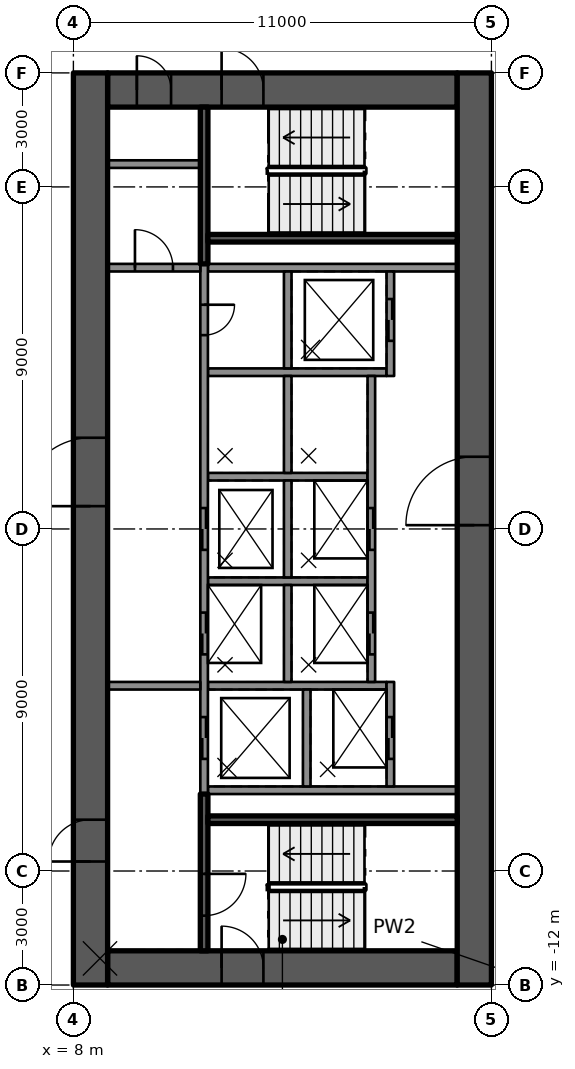
"""IFC4 building model, lengths in metres.
Left out: names, types, materials, properties, quantities, classifications, styles, units other than length and angle.
Written with IfcOpenShell. Run it as: python <this file> out.ifc"""

import sys

from ifc_helpers import new_model, si_unit, direction, frame, frame_2d, origin, place, context, subcontext, project, spatial, rectangle, extrude, element, fill, save


model = new_model("IFC4")
c1 = context("Model", 3, precision=1e-05, world=origin(), true_north=direction((0.0, 1.0)))
c2 = subcontext(c1, "Body", "Model", "MODEL_VIEW")
j1 = project(units=[si_unit("LENGTHUNIT", "METRE"), si_unit("PLANEANGLEUNIT", "RADIAN")], contexts=[c1])
p1 = place(None, origin())
s1 = spatial("IfcSite", under=j1, at=p1, CompositionType="ELEMENT")
p2 = place(p1, origin())
s2 = spatial("IfcBuilding", under=s1, at=p2, CompositionType="ELEMENT")
p3 = place(p2, frame((0.0, 0.0, 69.3)))
s3 = spatial("IfcBuildingStorey", under=s2, at=p3, CompositionType="ELEMENT", Elevation=69.3)
p4 = place(p3, frame((8.9, 11.55, 0.0), z_axis=(0.0, 0.0, 1.0), x_axis=(1.0, 0.0, 0.0)))
e1 = element("IfcWall", 1, at=p4, inside=s3, PredefinedType="SHEAR", context=c2, shape_type="SweptSolid", body=[
    extrude(rectangle(XDim=9.2, YDim=0.9, at=frame_2d((4.6, 0.0))), origin(), (0.0, 0.0, 1.0), 3.5),
])
p5 = place(p4, frame((3.0, 0.0, 0.0)))
e2 = element("IfcOpeningElement", 2, at=p5, cuts=e1, PredefinedType="OPENING", context=c2, shape_type="SweptSolid", body=[
    extrude(rectangle(XDim=1.1, YDim=2.1, at=frame_2d((0.55, 1.05))), frame((0.0, 0.46, 0.0), z_axis=(0.0, -1.0, 0.0), x_axis=(1.0, 0.0, 0.0)), (0.0, 0.0, 1.0), 0.92),
])
p6 = place(p4, frame((0.77, 0.0, 0.0)))
e3 = element("IfcOpeningElement", 3, at=p6, cuts=e1, PredefinedType="OPENING", context=c2, shape_type="SweptSolid", body=[
    extrude(rectangle(XDim=0.9, YDim=2.1, at=frame_2d((0.45, 1.05))), frame((0.0, 0.46, 0.0), z_axis=(0.0, -1.0, 0.0), x_axis=(1.0, 0.0, 0.0)), (0.0, 0.0, 1.0), 0.92),
])
p7 = place(p3, frame((8.9, -11.55, 0.0), z_axis=(0.0, 0.0, 1.0), x_axis=(1.0, 0.0, 0.0)))
e4 = element("IfcWall", 4, at=p7, inside=s3, PredefinedType="SHEAR", context=c2, shape_type="SweptSolid", body=[
    extrude(rectangle(XDim=9.2, YDim=0.9, at=frame_2d((4.6, 0.0))), origin(), (0.0, 0.0, 1.0), 3.5),
])
p8 = place(p7, frame((3.0, 0.0, 0.0)))
e5 = element("IfcOpeningElement", 5, at=p8, cuts=e4, PredefinedType="OPENING", context=c2, shape_type="SweptSolid", body=[
    extrude(rectangle(XDim=1.1, YDim=2.1, at=frame_2d((0.55, 1.05))), frame((0.0, 0.46, 0.0), z_axis=(0.0, -1.0, 0.0), x_axis=(1.0, 0.0, 0.0)), (0.0, 0.0, 1.0), 0.92),
])
p9 = place(p3, frame((8.45, -12.0, 0.0), z_axis=(0.0, 0.0, 1.0), x_axis=(0.0, 1.0, 0.0)))
e6 = element("IfcWall", 6, at=p9, inside=s3, PredefinedType="SHEAR", context=c2, shape_type="SweptSolid", body=[
    extrude(rectangle(XDim=24.0, YDim=0.9, at=frame_2d((12.0, 0.0))), origin(), (0.0, 0.0, 1.0), 3.5),
])
p10 = place(p9, frame((12.6, 0.0, 0.0)))
e7 = element("IfcOpeningElement", 7, at=p10, cuts=e6, PredefinedType="OPENING", context=c2, shape_type="SweptSolid", body=[
    extrude(rectangle(XDim=1.8, YDim=2.1, at=frame_2d((0.9, 1.05))), frame((0.0, 0.46, 0.0), z_axis=(0.0, -1.0, 0.0), x_axis=(1.0, 0.0, 0.0)), (0.0, 0.0, 1.0), 0.92),
])
p11 = place(p9, frame((3.25, 0.0, 0.0)))
e8 = element("IfcOpeningElement", 8, at=p11, cuts=e6, PredefinedType="OPENING", context=c2, shape_type="SweptSolid", body=[
    extrude(rectangle(XDim=1.1, YDim=2.1, at=frame_2d((0.55, 1.05))), frame((0.0, 0.46, 0.0), z_axis=(0.0, -1.0, 0.0), x_axis=(1.0, 0.0, 0.0)), (0.0, 0.0, 1.0), 0.92),
])
p12 = place(p3, frame((18.55, -12.0, 0.0), z_axis=(0.0, 0.0, 1.0), x_axis=(0.0, 1.0, 0.0)))
e9 = element("IfcWall", 9, at=p12, inside=s3, PredefinedType="SHEAR", context=c2, shape_type="SweptSolid", body=[
    extrude(rectangle(XDim=24.0, YDim=0.9, at=frame_2d((12.0, 0.0))), origin(), (0.0, 0.0, 1.0), 3.5),
])
p13 = place(p12, frame((12.1, 0.0, 0.0)))
e10 = element("IfcOpeningElement", 10, at=p13, cuts=e9, PredefinedType="OPENING", context=c2, shape_type="SweptSolid", body=[
    extrude(rectangle(XDim=1.8, YDim=2.1, at=frame_2d((0.9, 1.05))), frame((0.0, 0.46, 0.0), z_axis=(0.0, -1.0, 0.0), x_axis=(1.0, 0.0, 0.0)), (0.0, 0.0, 1.0), 0.92),
])
for number, where, z_axis, x_axis in (
    (11, (11.54, -6.875, 0.0), (0.0, 0.0, 1.0), (1.0, 0.0, 0.0)),
    (12, (11.54, 6.875, 0.0), (0.0, 0.0, 1.0), (1.0, 0.0, 0.0)),
):
    element("IfcWall", number, at=place(p3, frame(where, z_axis=z_axis, x_axis=x_axis)), inside=s3, PredefinedType="SOLIDWALL", context=c2, shape_type="SweptSolid", body=[
        extrude(rectangle(XDim=6.56, YDim=0.2, at=frame_2d((3.28, 0.0))), origin(), (0.0, 0.0, 1.0), 3.09),
    ])
p14 = place(p3, frame((11.54, 4.125, 0.0), z_axis=(0.0, 0.0, 1.0), x_axis=(1.0, 0.0, 0.0)))
e13 = element("IfcWall", 13, at=p14, inside=s3, PredefinedType="SOLIDWALL", context=c2, shape_type="SweptSolid", body=[
    extrude(rectangle(XDim=4.7, YDim=0.2, at=frame_2d((2.35, 0.0))), origin(), (0.0, 0.0, 1.0), 3.09),
])
for number, where, z_axis, x_axis in (
    (14, (11.54, 1.375, 0.0), (0.0, 0.0, 1.0), (1.0, 0.0, 0.0)),
    (15, (11.54, -1.375, 0.0), (0.0, 0.0, 1.0), (1.0, 0.0, 0.0)),
):
    element("IfcWall", number, at=place(p3, frame(where, z_axis=z_axis, x_axis=x_axis)), inside=s3, PredefinedType="SOLIDWALL", context=c2, shape_type="SweptSolid", body=[
        extrude(rectangle(XDim=4.2, YDim=0.2, at=frame_2d((2.1, 0.0))), origin(), (0.0, 0.0, 1.0), 3.09),
    ])
p15 = place(p3, frame((11.54, -4.125, 0.0), z_axis=(0.0, 0.0, 1.0), x_axis=(1.0, 0.0, 0.0)))
e16 = element("IfcWall", 16, at=p15, inside=s3, PredefinedType="SOLIDWALL", context=c2, shape_type="SweptSolid", body=[
    extrude(rectangle(XDim=4.7, YDim=0.2, at=frame_2d((2.35, 0.0))), origin(), (0.0, 0.0, 1.0), 3.09),
])
p16 = place(p3, frame((11.44, 6.975, 0.0), z_axis=(0.0, 0.0, 1.0), x_axis=(0.0, -1.0, 0.0)))
e17 = element("IfcWall", 17, at=p16, inside=s3, PredefinedType="SOLIDWALL", context=c2, shape_type="SweptSolid", body=[
    extrude(rectangle(XDim=13.95, YDim=0.2, at=frame_2d((6.975, 0.0))), origin(), (0.0, 0.0, 1.0), 3.09),
])
p17 = place(p16, frame((6.425, 0.0, 0.0)))
e18 = element("IfcOpeningElement", 18, at=p17, cuts=e17, PredefinedType="OPENING", context=c2, shape_type="SweptSolid", body=[
    extrude(rectangle(XDim=1.1, YDim=2.1, at=frame_2d((0.55, 1.05))), frame((0.0, 0.11, 0.0), z_axis=(0.0, -1.0, 0.0), x_axis=(1.0, 0.0, 0.0)), (0.0, 0.0, 1.0), 0.22),
])
p18 = place(p16, frame((9.175, 0.0, 0.0)))
e19 = element("IfcOpeningElement", 19, at=p18, cuts=e17, PredefinedType="OPENING", context=c2, shape_type="SweptSolid", body=[
    extrude(rectangle(XDim=1.1, YDim=2.1, at=frame_2d((0.55, 1.05))), frame((0.0, 0.11, 0.0), z_axis=(0.0, -1.0, 0.0), x_axis=(1.0, 0.0, 0.0)), (0.0, 0.0, 1.0), 0.22),
])
p19 = place(p16, frame((11.925, 0.0, 0.0)))
e20 = element("IfcOpeningElement", 20, at=p19, cuts=e17, PredefinedType="OPENING", context=c2, shape_type="SweptSolid", body=[
    extrude(rectangle(XDim=1.1, YDim=2.1, at=frame_2d((0.55, 1.05))), frame((0.0, 0.11, 0.0), z_axis=(0.0, -1.0, 0.0), x_axis=(1.0, 0.0, 0.0)), (0.0, 0.0, 1.0), 0.22),
])
p20 = place(p16, frame((1.075, 0.0, 0.0)))
e21 = element("IfcOpeningElement", 21, at=p20, cuts=e17, PredefinedType="OPENING", context=c2, shape_type="SweptSolid", body=[
    extrude(rectangle(XDim=0.8, YDim=2.1, at=frame_2d((0.4, 1.05))), frame((0.0, 0.11, 0.0), z_axis=(0.0, -1.0, 0.0), x_axis=(1.0, 0.0, 0.0)), (0.0, 0.0, 1.0), 0.22),
])
for number, where, z_axis, x_axis in (
    (22, (13.64, 6.775, 0.0), (0.0, 0.0, 1.0), (0.0, -1.0, 0.0)),
    (23, (13.64, 4.025, 0.0), (0.0, 0.0, 1.0), (0.0, -1.0, 0.0)),
    (24, (13.64, 1.275, 0.0), (0.0, 0.0, 1.0), (0.0, -1.0, 0.0)),
    (25, (13.64, -1.475, 0.0), (0.0, 0.0, 1.0), (0.0, -1.0, 0.0)),
    (26, (14.14, -4.225, 0.0), (0.0, 0.0, 1.0), (0.0, -1.0, 0.0)),
):
    element("IfcWall", number, at=place(p3, frame(where, z_axis=z_axis, x_axis=x_axis)), inside=s3, PredefinedType="SOLIDWALL", context=c2, shape_type="SweptSolid", body=[
        extrude(rectangle(XDim=2.55, YDim=0.2, at=frame_2d((1.275, 0.0))), origin(), (0.0, 0.0, 1.0), 3.09),
    ])
p21 = place(p3, frame((16.34, 6.775, 0.0), z_axis=(0.0, 0.0, 1.0), x_axis=(0.0, -1.0, 0.0)))
e27 = element("IfcWall", 27, at=p21, inside=s3, PredefinedType="SOLIDWALL", context=c2, shape_type="SweptSolid", body=[
    extrude(rectangle(XDim=2.75, YDim=0.2, at=frame_2d((1.375, 0.0))), origin(), (0.0, 0.0, 1.0), 3.09),
])
p22 = place(p21, frame((0.725, 0.0, 0.0)))
e28 = element("IfcOpeningElement", 28, at=p22, cuts=e27, PredefinedType="OPENING", context=c2, shape_type="SweptSolid", body=[
    extrude(rectangle(XDim=1.1, YDim=2.1, at=frame_2d((0.55, 1.05))), frame((0.0, 0.11, 0.0), z_axis=(0.0, -1.0, 0.0), x_axis=(1.0, 0.0, 0.0)), (0.0, 0.0, 1.0), 0.22),
])
p23 = place(p3, frame((15.84, 4.025, 0.0), z_axis=(0.0, 0.0, 1.0), x_axis=(0.0, -1.0, 0.0)))
e29 = element("IfcWall", 29, at=p23, inside=s3, PredefinedType="SOLIDWALL", context=c2, shape_type="SweptSolid", body=[
    extrude(rectangle(XDim=8.05, YDim=0.2, at=frame_2d((4.025, 0.0))), origin(), (0.0, 0.0, 1.0), 3.09),
])
p24 = place(p23, frame((3.475, 0.0, 0.0)))
e30 = element("IfcOpeningElement", 30, at=p24, cuts=e29, PredefinedType="OPENING", context=c2, shape_type="SweptSolid", body=[
    extrude(rectangle(XDim=1.1, YDim=2.1, at=frame_2d((0.55, 1.05))), frame((0.0, 0.11, 0.0), z_axis=(0.0, -1.0, 0.0), x_axis=(1.0, 0.0, 0.0)), (0.0, 0.0, 1.0), 0.22),
])
p25 = place(p23, frame((6.225, 0.0, 0.0)))
e31 = element("IfcOpeningElement", 31, at=p25, cuts=e29, PredefinedType="OPENING", context=c2, shape_type="SweptSolid", body=[
    extrude(rectangle(XDim=1.1, YDim=2.1, at=frame_2d((0.55, 1.05))), frame((0.0, 0.11, 0.0), z_axis=(0.0, -1.0, 0.0), x_axis=(1.0, 0.0, 0.0)), (0.0, 0.0, 1.0), 0.22),
])
p26 = place(p3, frame((16.34, -4.025, 0.0), z_axis=(0.0, 0.0, 1.0), x_axis=(0.0, -1.0, 0.0)))
e32 = element("IfcWall", 32, at=p26, inside=s3, PredefinedType="SOLIDWALL", context=c2, shape_type="SweptSolid", body=[
    extrude(rectangle(XDim=2.75, YDim=0.2, at=frame_2d((1.375, 0.0))), origin(), (0.0, 0.0, 1.0), 3.09),
])
p27 = place(p26, frame((0.925, 0.0, 0.0)))
e33 = element("IfcOpeningElement", 33, at=p27, cuts=e32, PredefinedType="OPENING", context=c2, shape_type="SweptSolid", body=[
    extrude(rectangle(XDim=1.1, YDim=2.1, at=frame_2d((0.55, 1.05))), frame((0.0, 0.11, 0.0), z_axis=(0.0, -1.0, 0.0), x_axis=(1.0, 0.0, 0.0)), (0.0, 0.0, 1.0), 0.22),
])
p28 = place(p3, frame((11.44, -6.975, 0.0), z_axis=(0.0, 0.0, 1.0), x_axis=(0.0, -1.0, 0.0)))
e34 = element("IfcWall", 34, at=p28, inside=s3, PredefinedType="SOLIDWALL", context=c2, shape_type="SweptSolid", body=[
    extrude(rectangle(XDim=4.125, YDim=0.2, at=frame_2d((2.062, 0.0))), origin(), (0.0, 0.0, 1.0), 3.09),
])
p29 = place(p28, frame((2.1, 0.0, 0.0)))
e35 = element("IfcOpeningElement", 35, at=p29, cuts=e34, PredefinedType="OPENING", context=c2, shape_type="SweptSolid", body=[
    extrude(rectangle(XDim=1.1, YDim=2.1, at=frame_2d((0.55, 1.05))), frame((0.0, 0.11, 0.0), z_axis=(0.0, -1.0, 0.0), x_axis=(1.0, 0.0, 0.0)), (0.0, 0.0, 1.0), 0.22),
])
p30 = place(p3, frame((11.54, -7.65, 0.0), z_axis=(0.0, 0.0, 1.0), x_axis=(1.0, 0.0, 0.0)))
e36 = element("IfcWall", 36, at=p30, inside=s3, PredefinedType="SOLIDWALL", context=c2, shape_type="SweptSolid", body=[
    extrude(rectangle(XDim=6.56, YDim=0.2, at=frame_2d((3.28, 0.0))), origin(), (0.0, 0.0, 1.0), 3.09),
])
p31 = place(p3, frame((11.44, 11.1, 0.0), z_axis=(0.0, 0.0, 1.0), x_axis=(0.0, -1.0, 0.0)))
e37 = element("IfcWall", 37, at=p31, inside=s3, PredefinedType="SOLIDWALL", context=c2, shape_type="SweptSolid", body=[
    extrude(rectangle(XDim=4.125, YDim=0.2, at=frame_2d((2.062, 0.0))), origin(), (0.0, 0.0, 1.0), 3.09),
])
p32 = place(p3, frame((11.54, 7.65, 0.0), z_axis=(0.0, 0.0, 1.0), x_axis=(1.0, 0.0, 0.0)))
e38 = element("IfcWall", 38, at=p32, inside=s3, PredefinedType="SOLIDWALL", context=c2, shape_type="SweptSolid", body=[
    extrude(rectangle(XDim=6.56, YDim=0.2, at=frame_2d((3.28, 0.0))), origin(), (0.0, 0.0, 1.0), 3.09),
])
p33 = place(p3, frame((8.9, -4.125, 0.0), z_axis=(0.0, 0.0, 1.0), x_axis=(1.0, 0.0, 0.0)))
e39 = element("IfcWall", 39, at=p33, inside=s3, PredefinedType="PARTITIONING", context=c2, shape_type="SweptSolid", body=[
    extrude(rectangle(XDim=2.44, YDim=0.2, at=frame_2d((1.22, 0.0))), origin(), (0.0, 0.0, 1.0), 3.09),
])
p34 = place(p3, frame((8.9, 6.875, 0.0), z_axis=(0.0, 0.0, 1.0), x_axis=(1.0, 0.0, 0.0)))
e40 = element("IfcWall", 40, at=p34, inside=s3, PredefinedType="PARTITIONING", context=c2, shape_type="SweptSolid", body=[
    extrude(rectangle(XDim=2.44, YDim=0.2, at=frame_2d((1.22, 0.0))), origin(), (0.0, 0.0, 1.0), 3.09),
])
p35 = place(p34, frame((0.72, 0.0, 0.0)))
e41 = element("IfcOpeningElement", 41, at=p35, cuts=e40, PredefinedType="OPENING", context=c2, shape_type="SweptSolid", body=[
    extrude(rectangle(XDim=1.0, YDim=2.1, at=frame_2d((0.5, 1.05))), frame((0.0, 0.11, 0.0), z_axis=(0.0, -1.0, 0.0), x_axis=(1.0, 0.0, 0.0)), (0.0, 0.0, 1.0), 0.22),
])
p36 = place(p3, frame((8.9, 9.6, 0.0), z_axis=(0.0, 0.0, 1.0), x_axis=(1.0, 0.0, 0.0)))
e42 = element("IfcWall", 42, at=p36, inside=s3, PredefinedType="PARTITIONING", context=c2, shape_type="SweptSolid", body=[
    extrude(rectangle(XDim=2.44, YDim=0.2, at=frame_2d((1.22, 0.0))), origin(), (0.0, 0.0, 1.0), 3.09),
])
p37 = place(p22, origin())
e43 = element("IfcDoor", 43, at=p37, inside=s3, OperationType="DOUBLE_DOOR_SLIDING", PredefinedType="DOOR", context=c2, shape_type="SweptSolid", body=[
    extrude(rectangle(XDim=1.1, YDim=2.1, at=frame_2d((0.55, 1.05))), frame((0.0, 0.025, 0.0), z_axis=(0.0, -1.0, 0.0), x_axis=(1.0, 0.0, 0.0)), (0.0, 0.0, 1.0), 0.05),
])
fill(e28, e43)
p38 = place(p17, origin())
e44 = element("IfcDoor", 44, at=p38, inside=s3, OperationType="DOUBLE_DOOR_SLIDING", PredefinedType="DOOR", context=c2, shape_type="SweptSolid", body=[
    extrude(rectangle(XDim=1.1, YDim=2.1, at=frame_2d((0.55, 1.05))), frame((0.0, 0.025, 0.0), z_axis=(0.0, -1.0, 0.0), x_axis=(1.0, 0.0, 0.0)), (0.0, 0.0, 1.0), 0.05),
])
fill(e18, e44)
p39 = place(p24, origin())
e45 = element("IfcDoor", 45, at=p39, inside=s3, OperationType="DOUBLE_DOOR_SLIDING", PredefinedType="DOOR", context=c2, shape_type="SweptSolid", body=[
    extrude(rectangle(XDim=1.1, YDim=2.1, at=frame_2d((0.55, 1.05))), frame((0.0, 0.025, 0.0), z_axis=(0.0, -1.0, 0.0), x_axis=(1.0, 0.0, 0.0)), (0.0, 0.0, 1.0), 0.05),
])
fill(e30, e45)
p40 = place(p18, origin())
e46 = element("IfcDoor", 46, at=p40, inside=s3, OperationType="DOUBLE_DOOR_SLIDING", PredefinedType="DOOR", context=c2, shape_type="SweptSolid", body=[
    extrude(rectangle(XDim=1.1, YDim=2.1, at=frame_2d((0.55, 1.05))), frame((0.0, 0.025, 0.0), z_axis=(0.0, -1.0, 0.0), x_axis=(1.0, 0.0, 0.0)), (0.0, 0.0, 1.0), 0.05),
])
fill(e19, e46)
p41 = place(p25, origin())
e47 = element("IfcDoor", 47, at=p41, inside=s3, OperationType="DOUBLE_DOOR_SLIDING", PredefinedType="DOOR", context=c2, shape_type="SweptSolid", body=[
    extrude(rectangle(XDim=1.1, YDim=2.1, at=frame_2d((0.55, 1.05))), frame((0.0, 0.025, 0.0), z_axis=(0.0, -1.0, 0.0), x_axis=(1.0, 0.0, 0.0)), (0.0, 0.0, 1.0), 0.05),
])
fill(e31, e47)
p42 = place(p19, origin())
e48 = element("IfcDoor", 48, at=p42, inside=s3, OperationType="DOUBLE_DOOR_SLIDING", PredefinedType="DOOR", context=c2, shape_type="SweptSolid", body=[
    extrude(rectangle(XDim=1.1, YDim=2.1, at=frame_2d((0.55, 1.05))), frame((0.0, 0.025, 0.0), z_axis=(0.0, -1.0, 0.0), x_axis=(1.0, 0.0, 0.0)), (0.0, 0.0, 1.0), 0.05),
])
fill(e20, e48)
p43 = place(p27, origin())
e49 = element("IfcDoor", 49, at=p43, inside=s3, OperationType="DOUBLE_DOOR_SLIDING", PredefinedType="DOOR", context=c2, shape_type="SweptSolid", body=[
    extrude(rectangle(XDim=1.1, YDim=2.1, at=frame_2d((0.55, 1.05))), frame((0.0, 0.025, 0.0), z_axis=(0.0, -1.0, 0.0), x_axis=(1.0, 0.0, 0.0)), (0.0, 0.0, 1.0), 0.05),
])
fill(e33, e49)
p44 = place(p20, origin())
e50 = element("IfcDoor", 50, at=p44, inside=s3, OperationType="SINGLE_SWING_LEFT", PredefinedType="DOOR", context=c2, shape_type="SweptSolid", body=[
    extrude(rectangle(XDim=0.8, YDim=2.1, at=frame_2d((0.4, 1.05))), frame((0.0, 0.025, 0.0), z_axis=(0.0, -1.0, 0.0), x_axis=(1.0, 0.0, 0.0)), (0.0, 0.0, 1.0), 0.05),
])
fill(e21, e50)
p45 = place(p10, origin())
e51 = element("IfcDoor", 51, at=p45, inside=s3, OperationType="SINGLE_SWING_RIGHT", PredefinedType="DOOR", context=c2, shape_type="SweptSolid", body=[
    extrude(rectangle(XDim=1.8, YDim=2.1, at=frame_2d((0.9, 1.05))), frame((0.0, 0.025, 0.0), z_axis=(0.0, -1.0, 0.0), x_axis=(1.0, 0.0, 0.0)), (0.0, 0.0, 1.0), 0.05),
])
fill(e7, e51)
p46 = place(p13, origin())
e52 = element("IfcDoor", 52, at=p46, inside=s3, OperationType="SINGLE_SWING_RIGHT", PredefinedType="DOOR", context=c2, shape_type="SweptSolid", body=[
    extrude(rectangle(XDim=1.8, YDim=2.1, at=frame_2d((0.9, 1.05))), frame((0.0, 0.025, 0.0), z_axis=(0.0, -1.0, 0.0), x_axis=(1.0, 0.0, 0.0)), (0.0, 0.0, 1.0), 0.05),
])
fill(e10, e52)
p47 = place(p11, origin())
e53 = element("IfcDoor", 53, at=p47, inside=s3, OperationType="SINGLE_SWING_LEFT", PredefinedType="DOOR", context=c2, shape_type="SweptSolid", body=[
    extrude(rectangle(XDim=1.1, YDim=2.1, at=frame_2d((0.55, 1.05))), frame((0.0, 0.025, 0.0), z_axis=(0.0, -1.0, 0.0), x_axis=(1.0, 0.0, 0.0)), (0.0, 0.0, 1.0), 0.05),
])
fill(e8, e53)
p48 = place(p8, origin())
e54 = element("IfcDoor", 54, at=p48, inside=s3, OperationType="SINGLE_SWING_LEFT", PredefinedType="DOOR", context=c2, shape_type="SweptSolid", body=[
    extrude(rectangle(XDim=1.1, YDim=2.1, at=frame_2d((0.55, 1.05))), frame((0.0, 0.025, 0.0), z_axis=(0.0, -1.0, 0.0), x_axis=(1.0, 0.0, 0.0)), (0.0, 0.0, 1.0), 0.05),
])
fill(e5, e54)
p49 = place(p5, origin())
e55 = element("IfcDoor", 55, at=p49, inside=s3, OperationType="SINGLE_SWING_LEFT", PredefinedType="DOOR", context=c2, shape_type="SweptSolid", body=[
    extrude(rectangle(XDim=1.1, YDim=2.1, at=frame_2d((0.55, 1.05))), frame((0.0, 0.025, 0.0), z_axis=(0.0, -1.0, 0.0), x_axis=(1.0, 0.0, 0.0)), (0.0, 0.0, 1.0), 0.05),
])
fill(e2, e55)
p50 = place(p29, origin())
e56 = element("IfcDoor", 56, at=p50, inside=s3, OperationType="SINGLE_SWING_RIGHT", PredefinedType="DOOR", context=c2, shape_type="SweptSolid", body=[
    extrude(rectangle(XDim=1.1, YDim=2.1, at=frame_2d((0.55, 1.05))), frame((0.0, 0.025, 0.0), z_axis=(0.0, -1.0, 0.0), x_axis=(1.0, 0.0, 0.0)), (0.0, 0.0, 1.0), 0.05),
])
fill(e35, e56)
p51 = place(p6, origin())
e57 = element("IfcDoor", 57, at=p51, inside=s3, OperationType="SINGLE_SWING_LEFT", PredefinedType="DOOR", context=c2, shape_type="SweptSolid", body=[
    extrude(rectangle(XDim=0.9, YDim=2.1, at=frame_2d((0.45, 1.05))), frame((0.0, 0.025, 0.0), z_axis=(0.0, -1.0, 0.0), x_axis=(1.0, 0.0, 0.0)), (0.0, 0.0, 1.0), 0.05),
])
fill(e3, e57)
p52 = place(p35, origin())
e58 = element("IfcDoor", 58, at=p52, inside=s3, OperationType="SINGLE_SWING_RIGHT", PredefinedType="DOOR", context=c2, shape_type="SweptSolid", body=[
    extrude(rectangle(XDim=1.0, YDim=2.1, at=frame_2d((0.5, 1.05))), frame((0.0, 0.025, 0.0), z_axis=(0.0, -1.0, 0.0), x_axis=(1.0, 0.0, 0.0)), (0.0, 0.0, 1.0), 0.05),
])
fill(e41, e58)
save(model, sys.argv[1])
